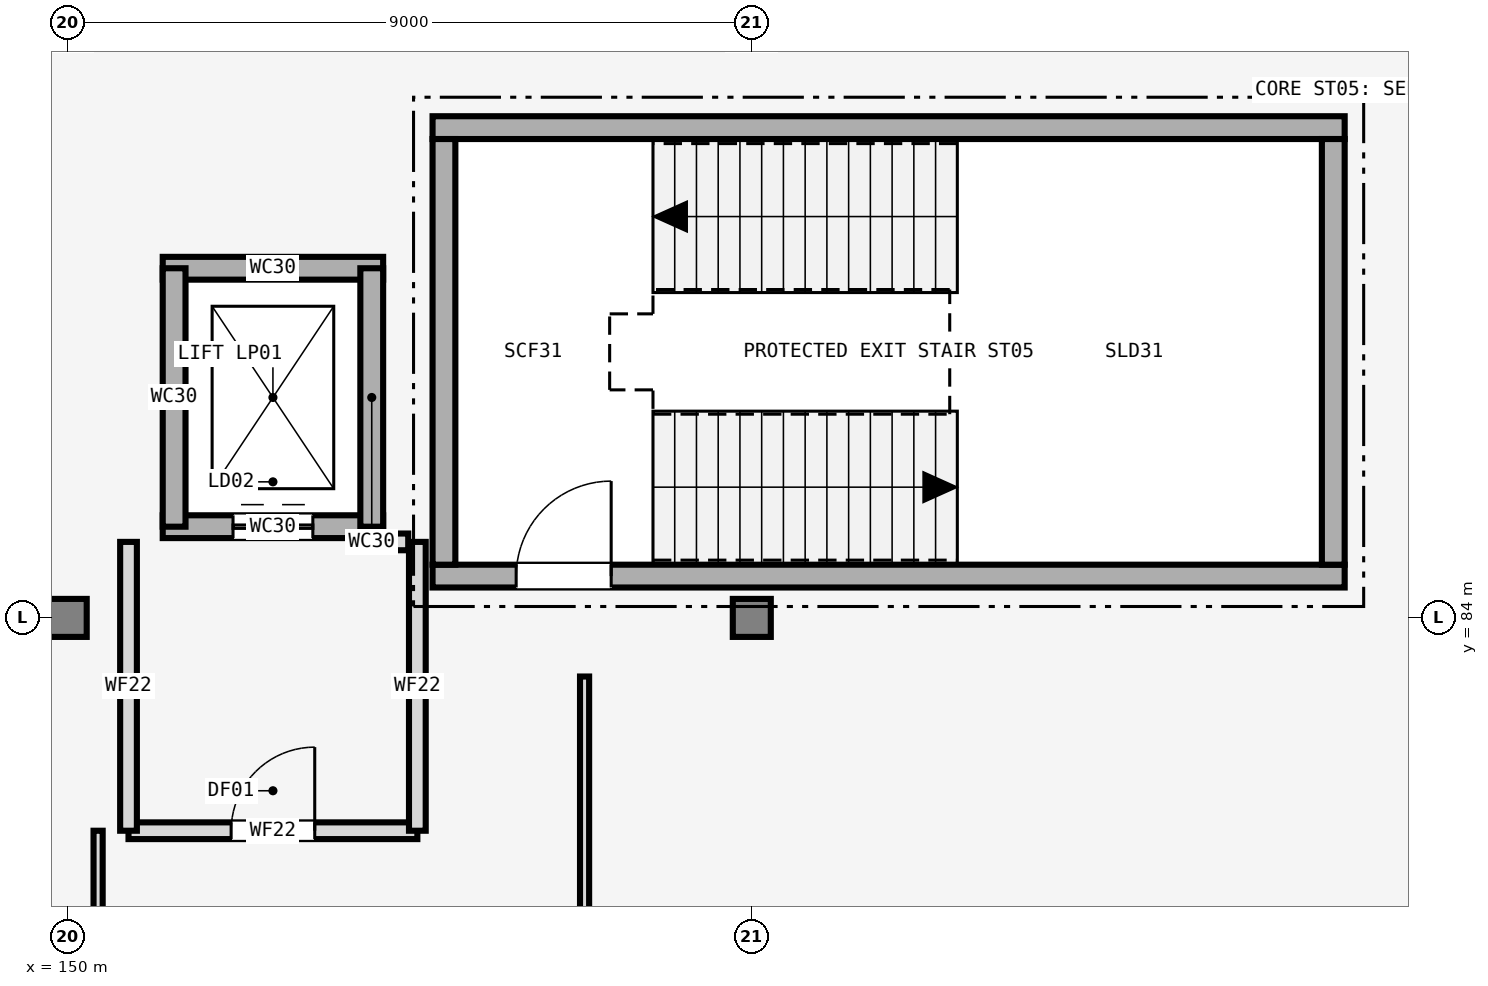
"""IFC4 building model, lengths in metres.
Left out: names, types, materials, properties, quantities, classifications, styles, units other than length and angle.
Written with IfcOpenShell. Run it as: python <this file> out.ifc"""

import sys

from ifc_helpers import new_model, si_unit, direction, frame, frame_2d, origin, origin_2d, place, context, subcontext, project, spatial, rectangle, extrude, element, fill, save


model = new_model("IFC4")
c1 = context("Model", 3, precision=1e-05, world=origin(), true_north=direction((0.0, 1.0)))
c2 = subcontext(c1, "Body", "Model", "MODEL_VIEW")
j1 = project(units=[si_unit("LENGTHUNIT", "METRE"), si_unit("PLANEANGLEUNIT", "RADIAN")], contexts=[c1])
p1 = place(None, origin())
s1 = spatial("IfcSite", under=j1, at=p1, CompositionType="ELEMENT")
p2 = place(p1, origin())
s2 = spatial("IfcBuilding", under=s1, at=p2, CompositionType="ELEMENT")
p3 = place(p2, frame((0.0, 0.0, 4.8)))
s3 = spatial("IfcBuildingStorey", under=s2, at=p3, CompositionType="ELEMENT", Elevation=4.8)
for number, where, z_axis, x_axis in (
    (1, (150.0, 84.0, 0.0), (0.0, 0.0, 1.0), (1.0, 0.0, 0.0)),
    (2, (159.0, 84.0, 0.0), (0.0, 0.0, 1.0), (1.0, 0.0, 0.0)),
):
    element("IfcColumn", number, at=place(p3, frame(where, z_axis=z_axis, x_axis=x_axis)), inside=s3, PredefinedType="COLUMN", context=c2, shape_type="SweptSolid", body=[
        extrude(rectangle(XDim=0.5, YDim=0.5, at=origin_2d()), origin(), (0.0, 0.0, 1.0), 4.5),
    ])
p4 = place(p3, frame((154.8, 84.55, 0.0), z_axis=(0.0, 0.0, 1.0), x_axis=(1.0, 0.0, 0.0)))
e3 = element("IfcWall", 3, at=p4, inside=s3, PredefinedType="SHEAR", context=c2, shape_type="SweptSolid", body=[
    extrude(rectangle(XDim=12.0, YDim=0.3, at=frame_2d((6.0, 0.0))), origin(), (0.0, 0.0, 1.0), 4.5),
])
p5 = place(p4, frame((1.1, 0.0, 0.0)))
e4 = element("IfcOpeningElement", 4, at=p5, cuts=e3, PredefinedType="OPENING", context=c2, shape_type="SweptSolid", body=[
    extrude(rectangle(XDim=1.25, YDim=2.15, at=frame_2d((0.625, 1.075))), frame((0.0, 0.16, 0.0), z_axis=(0.0, -1.0, 0.0), x_axis=(1.0, 0.0, 0.0)), (0.0, 0.0, 1.0), 0.32),
])
p6 = place(p3, frame((166.8, 90.45, 0.0), z_axis=(0.0, 0.0, 1.0), x_axis=(-1.0, 0.0, 0.0)))
e5 = element("IfcWall", 5, at=p6, inside=s3, PredefinedType="SHEAR", context=c2, shape_type="SweptSolid", body=[
    extrude(rectangle(XDim=12.0, YDim=0.3, at=frame_2d((6.0, 0.0))), origin(), (0.0, 0.0, 1.0), 4.5),
])
for number, where, z_axis, x_axis in (
    (6, (154.95, 90.3, 0.0), (0.0, 0.0, 1.0), (0.0, -1.0, 0.0)),
    (7, (166.65, 84.7, 0.0), (0.0, 0.0, 1.0), (0.0, 1.0, 0.0)),
):
    element("IfcWall", number, at=place(p3, frame(where, z_axis=z_axis, x_axis=x_axis)), inside=s3, PredefinedType="SHEAR", context=c2, shape_type="SweptSolid", body=[
        extrude(rectangle(XDim=5.6, YDim=0.3, at=frame_2d((2.8, 0.0))), origin(), (0.0, 0.0, 1.0), 4.5),
    ])
p7 = place(p3, frame((151.25, 85.2, 0.0), z_axis=(0.0, 0.0, 1.0), x_axis=(1.0, 0.0, 0.0)))
e8 = element("IfcWall", 8, at=p7, inside=s3, PredefinedType="SHEAR", context=c2, shape_type="SweptSolid", body=[
    extrude(rectangle(XDim=2.9, YDim=0.3, at=frame_2d((1.45, 0.0))), origin(), (0.0, 0.0, 1.0), 4.5),
])
p8 = place(p7, frame((0.925, 0.0, 0.0)))
e9 = element("IfcOpeningElement", 9, at=p8, cuts=e8, PredefinedType="OPENING", context=c2, shape_type="SweptSolid", body=[
    extrude(rectangle(XDim=1.05, YDim=2.15, at=frame_2d((0.525, 1.075))), frame((0.0, 0.16, 0.0), z_axis=(0.0, -1.0, 0.0), x_axis=(1.0, 0.0, 0.0)), (0.0, 0.0, 1.0), 0.32),
])
p9 = place(p3, frame((154.15, 88.6, 0.0), z_axis=(0.0, 0.0, 1.0), x_axis=(-1.0, 0.0, 0.0)))
e10 = element("IfcWall", 10, at=p9, inside=s3, PredefinedType="SHEAR", context=c2, shape_type="SweptSolid", body=[
    extrude(rectangle(XDim=2.9, YDim=0.3, at=frame_2d((1.45, 0.0))), origin(), (0.0, 0.0, 1.0), 4.5),
])
for number, where, z_axis, x_axis in (
    (11, (151.4, 88.6, 0.0), (0.0, 0.0, 1.0), (0.0, -1.0, 0.0)),
    (12, (154.0, 85.2, 0.0), (0.0, 0.0, 1.0), (0.0, 1.0, 0.0)),
):
    element("IfcWall", number, at=place(p3, frame(where, z_axis=z_axis, x_axis=x_axis)), inside=s3, PredefinedType="SHEAR", context=c2, shape_type="SweptSolid", body=[
        extrude(rectangle(XDim=3.4, YDim=0.3, at=frame_2d((1.7, 0.0))), origin(), (0.0, 0.0, 1.0), 4.5),
    ])
p10 = place(p3, frame((150.8, 81.2, 0.0), z_axis=(0.0, 0.0, 1.0), x_axis=(1.0, 0.0, 0.0)))
e13 = element("IfcWall", 13, at=p10, inside=s3, PredefinedType="SOLIDWALL", context=c2, shape_type="SweptSolid", body=[
    extrude(rectangle(XDim=3.8, YDim=0.22, at=frame_2d((1.9, 0.0))), origin(), (0.0, 0.0, 1.0), 3.4),
])
p11 = place(p10, frame((1.35, 0.0, 0.0)))
e14 = element("IfcOpeningElement", 14, at=p11, cuts=e13, PredefinedType="OPENING", context=c2, shape_type="SweptSolid", body=[
    extrude(rectangle(XDim=1.1, YDim=2.15, at=frame_2d((0.55, 1.075))), frame((0.0, 0.12, 0.0), z_axis=(0.0, -1.0, 0.0), x_axis=(1.0, 0.0, 0.0)), (0.0, 0.0, 1.0), 0.24),
])
for number, where, z_axis, x_axis in (
    (15, (150.8, 81.2, 0.0), (0.0, 0.0, 1.0), (0.0, 1.0, 0.0)),
    (16, (154.6, 81.2, 0.0), (0.0, 0.0, 1.0), (0.0, 1.0, 0.0)),
):
    element("IfcWall", number, at=place(p3, frame(where, z_axis=z_axis, x_axis=x_axis)), inside=s3, PredefinedType="SOLIDWALL", context=c2, shape_type="SweptSolid", body=[
        extrude(rectangle(XDim=3.8, YDim=0.22, at=frame_2d((1.9, 0.0))), origin(), (0.0, 0.0, 1.0), 3.4),
    ])
p12 = place(p3, frame((154.15, 85.0, 0.0), z_axis=(0.0, 0.0, 1.0), x_axis=(1.0, 0.0, 0.0)))
e17 = element("IfcWall", 17, at=p12, inside=s3, PredefinedType="SOLIDWALL", context=c2, shape_type="SweptSolid", body=[
    extrude(rectangle(XDim=0.33, YDim=0.22, at=frame_2d((0.165, 0.0))), origin(), (0.0, 0.0, 1.0), 3.4),
])
p13 = place(p3, frame((156.8, 62.04, 0.0), z_axis=(0.0, 0.0, 1.0), x_axis=(0.0, 1.0, 0.0)))
e18 = element("IfcWall", 18, at=p13, inside=s3, PredefinedType="PARTITIONING", context=c2, shape_type="SweptSolid", body=[
    extrude(rectangle(XDim=21.189, YDim=0.12, at=frame_2d((10.594, 0.0))), origin(), (0.0, 0.0, 1.0), 3.4),
])
p14 = place(p13, frame((10.094, 0.0, 0.0)))
e19 = element("IfcOpeningElement", 19, at=p14, cuts=e18, PredefinedType="OPENING", context=c2, shape_type="SweptSolid", body=[
    extrude(rectangle(XDim=1.0, YDim=2.1, at=frame_2d((0.5, 1.05))), frame((0.0, 0.07, 0.0), z_axis=(0.0, -1.0, 0.0), x_axis=(1.0, 0.0, 0.0)), (0.0, 0.0, 1.0), 0.14),
])
p15 = place(p3, frame((150.4, 81.2, 0.0), z_axis=(0.0, 0.0, 1.0), x_axis=(0.0, -1.0, 0.0)))
e20 = element("IfcWall", 20, at=p15, inside=s3, PredefinedType="PARTITIONING", context=c2, shape_type="SweptSolid", body=[
    extrude(rectangle(XDim=5.0, YDim=0.12, at=frame_2d((2.5, 0.0))), origin(), (0.0, 0.0, 1.0), 3.4),
])
p16 = place(p5, origin())
e21 = element("IfcDoor", 21, at=p16, inside=s3, OperationType="SINGLE_SWING_RIGHT", PredefinedType="DOOR", context=c2, shape_type="SweptSolid", body=[
    extrude(rectangle(XDim=1.25, YDim=2.15, at=frame_2d((0.625, 1.075))), frame((0.0, 0.025, 0.0), z_axis=(0.0, -1.0, 0.0), x_axis=(1.0, 0.0, 0.0)), (0.0, 0.0, 1.0), 0.05),
])
fill(e4, e21)
p17 = place(p8, origin())
e22 = element("IfcDoor", 22, at=p17, inside=s3, OperationType="DOUBLE_DOOR_SLIDING", PredefinedType="DOOR", context=c2, shape_type="SweptSolid", body=[
    extrude(rectangle(XDim=1.05, YDim=2.15, at=frame_2d((0.525, 1.075))), frame((0.0, 0.025, 0.0), z_axis=(0.0, -1.0, 0.0), x_axis=(1.0, 0.0, 0.0)), (0.0, 0.0, 1.0), 0.05),
])
fill(e9, e22)
p18 = place(p11, origin())
e23 = element("IfcDoor", 23, at=p18, inside=s3, OperationType="SINGLE_SWING_RIGHT", PredefinedType="DOOR", context=c2, shape_type="SweptSolid", body=[
    extrude(rectangle(XDim=1.1, YDim=2.15, at=frame_2d((0.55, 1.075))), frame((0.0, 0.025, 0.0), z_axis=(0.0, -1.0, 0.0), x_axis=(1.0, 0.0, 0.0)), (0.0, 0.0, 1.0), 0.05),
])
fill(e14, e23)
save(model, sys.argv[1])
